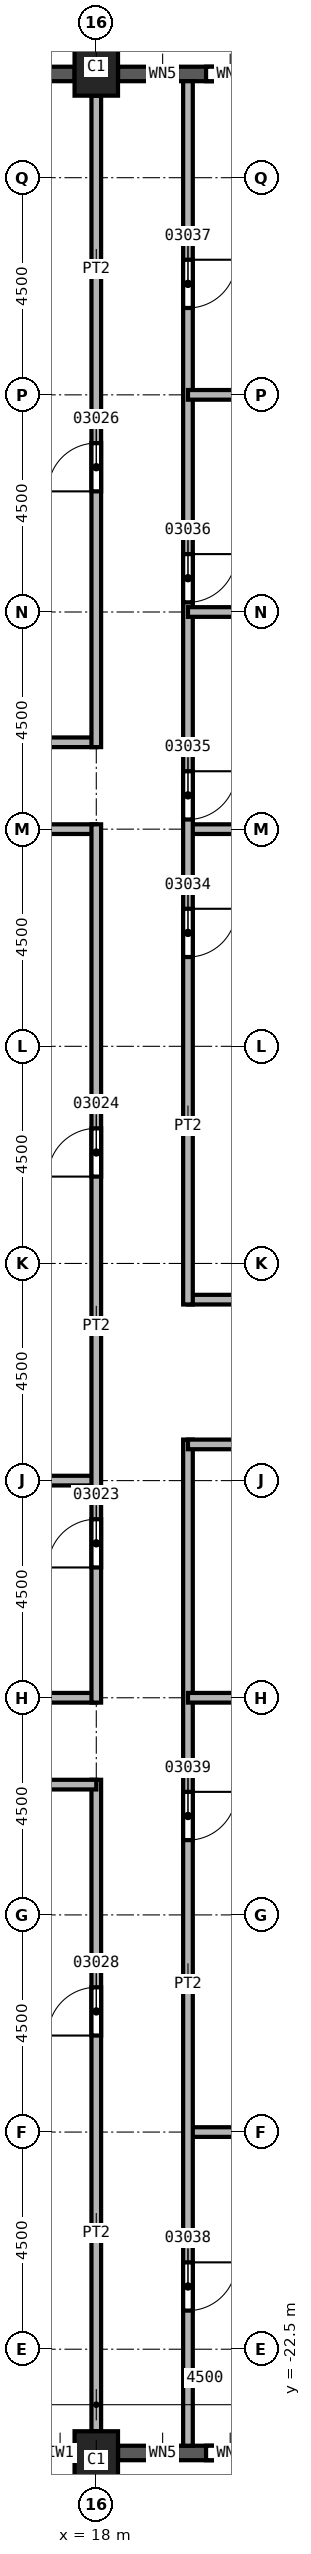
"""IFC4 building model, lengths in metres.
Left out: names, types, materials, properties, quantities, classifications, styles, units other than length and angle.
Written with IfcOpenShell. Run it as: python <this file> out.ifc"""

import sys

from ifc_helpers import new_model, si_unit, direction, frame, frame_2d, origin, origin_2d, place, context, subcontext, project, spatial, rectangle, extrude, element, fill, save


model = new_model("IFC4")
c1 = context("Model", 3, precision=1e-05, world=origin(), true_north=direction((0.0, 1.0)))
c2 = subcontext(c1, "Body", "Model", "MODEL_VIEW")
j1 = project(units=[si_unit("LENGTHUNIT", "METRE"), si_unit("PLANEANGLEUNIT", "RADIAN")], contexts=[c1])
p1 = place(None, origin())
s1 = spatial("IfcSite", under=j1, at=p1, CompositionType="ELEMENT")
p2 = place(p1, origin())
s2 = spatial("IfcBuilding", under=s1, at=p2, CompositionType="ELEMENT")
p3 = place(p2, frame((0.0, 0.0, 92.0)))
s3 = spatial("IfcBuildingStorey", under=s2, at=p3, CompositionType="ELEMENT", Elevation=92.0)
for number, where, z_axis, x_axis in (
    (1, (18.0, 24.8, 0.0), (0.0, 0.0, 1.0), (1.0, 0.0, 0.0)),
    (2, (18.0, -24.8, 0.0), (0.0, 0.0, 1.0), (1.0, 0.0, 0.0)),
):
    element("IfcColumn", number, at=place(p3, frame(where, z_axis=z_axis, x_axis=x_axis)), inside=s3, PredefinedType="COLUMN", context=c2, shape_type="SweptSolid", body=[
        extrude(rectangle(XDim=0.9, YDim=1.2, at=origin_2d()), origin(), (0.0, 0.0, 1.0), 3.7),
    ])
p4 = place(p3, frame((13.95, -24.65, 0.0), z_axis=(0.0, 0.0, 1.0), x_axis=(1.0, 0.0, 0.0)))
e3 = element("IfcWall", 3, at=p4, inside=s3, PredefinedType="SOLIDWALL", context=c2, shape_type="SweptSolid", body=[
    extrude(rectangle(XDim=3.6, YDim=0.3, at=frame_2d((1.8, 0.0))), origin(), (0.0, 0.0, 1.0), 3.1),
])
p5 = place(p4, frame((0.6, 0.0, 0.8)))
e4 = element("IfcOpeningElement", 4, at=p5, cuts=e3, PredefinedType="OPENING", context=c2, shape_type="SweptSolid", body=[
    extrude(rectangle(XDim=2.4, YDim=1.95, at=frame_2d((1.2, 0.975))), frame((0.0, 0.15, 0.0), z_axis=(0.0, -1.0, 0.0), x_axis=(1.0, 0.0, 0.0)), (0.0, 0.0, 1.0), 0.3),
])
p6 = place(p3, frame((18.45, -24.65, 0.0), z_axis=(0.0, 0.0, 1.0), x_axis=(1.0, 0.0, 0.0)))
e5 = element("IfcWall", 5, at=p6, inside=s3, PredefinedType="SOLIDWALL", context=c2, shape_type="SweptSolid", body=[
    extrude(rectangle(XDim=3.6, YDim=0.3, at=frame_2d((1.8, 0.0))), origin(), (0.0, 0.0, 1.0), 3.1),
])
p7 = place(p6, frame((0.625, 0.0, 0.8)))
e6 = element("IfcOpeningElement", 6, at=p7, cuts=e5, PredefinedType="OPENING", context=c2, shape_type="SweptSolid", body=[
    extrude(rectangle(XDim=0.6, YDim=1.95, at=frame_2d((0.3, 0.975))), frame((0.0, 0.15, 0.0), z_axis=(0.0, -1.0, 0.0), x_axis=(1.0, 0.0, 0.0)), (0.0, 0.0, 1.0), 0.3),
])
p8 = place(p6, frame((1.825, 0.0, 0.8)))
e7 = element("IfcOpeningElement", 7, at=p8, cuts=e5, PredefinedType="OPENING", context=c2, shape_type="SweptSolid", body=[
    extrude(rectangle(XDim=1.0, YDim=1.95, at=frame_2d((0.5, 0.975))), frame((0.0, 0.15, 0.0), z_axis=(0.0, -1.0, 0.0), x_axis=(1.0, 0.0, 0.0)), (0.0, 0.0, 1.0), 0.3),
])
p9 = place(p3, frame((22.05, 24.65, 0.0), z_axis=(0.0, 0.0, 1.0), x_axis=(-1.0, 0.0, 0.0)))
e8 = element("IfcWall", 8, at=p9, inside=s3, PredefinedType="SOLIDWALL", context=c2, shape_type="SweptSolid", body=[
    extrude(rectangle(XDim=3.6, YDim=0.3, at=frame_2d((1.8, 0.0))), origin(), (0.0, 0.0, 1.0), 3.1),
])
p10 = place(p9, frame((0.775, 0.0, 0.8)))
e9 = element("IfcOpeningElement", 9, at=p10, cuts=e8, PredefinedType="OPENING", context=c2, shape_type="SweptSolid", body=[
    extrude(rectangle(XDim=1.0, YDim=1.95, at=frame_2d((0.5, 0.975))), frame((0.0, 0.15, 0.0), z_axis=(0.0, -1.0, 0.0), x_axis=(1.0, 0.0, 0.0)), (0.0, 0.0, 1.0), 0.3),
])
p11 = place(p9, frame((2.375, 0.0, 0.8)))
e10 = element("IfcOpeningElement", 10, at=p11, cuts=e8, PredefinedType="OPENING", context=c2, shape_type="SweptSolid", body=[
    extrude(rectangle(XDim=0.6, YDim=1.95, at=frame_2d((0.3, 0.975))), frame((0.0, 0.15, 0.0), z_axis=(0.0, -1.0, 0.0), x_axis=(1.0, 0.0, 0.0)), (0.0, 0.0, 1.0), 0.3),
])
p12 = place(p3, frame((17.55, 24.65, 0.0), z_axis=(0.0, 0.0, 1.0), x_axis=(-1.0, 0.0, 0.0)))
e11 = element("IfcWall", 11, at=p12, inside=s3, PredefinedType="SOLIDWALL", context=c2, shape_type="SweptSolid", body=[
    extrude(rectangle(XDim=3.6, YDim=0.3, at=frame_2d((1.8, 0.0))), origin(), (0.0, 0.0, 1.0), 3.1),
])
p13 = place(p12, frame((0.6, 0.0, 0.8)))
e12 = element("IfcOpeningElement", 12, at=p13, cuts=e11, PredefinedType="OPENING", context=c2, shape_type="SweptSolid", body=[
    extrude(rectangle(XDim=2.4, YDim=1.95, at=frame_2d((1.2, 0.975))), frame((0.0, 0.15, 0.0), z_axis=(0.0, -1.0, 0.0), x_axis=(1.0, 0.0, 0.0)), (0.0, 0.0, 1.0), 0.3),
])
for number, where, z_axis, x_axis in (
    (13, (13.5, -9.0, 0.0), (0.0, 0.0, 1.0), (1.0, 0.0, 0.0)),
    (14, (13.5, -4.5, 0.0), (0.0, 0.0, 1.0), (1.0, 0.0, 0.0)),
    (15, (18.0, 9.0, 0.0), (0.0, 0.0, 1.0), (-1.0, 0.0, 0.0)),
):
    element("IfcWall", number, at=place(p3, frame(where, z_axis=z_axis, x_axis=x_axis)), inside=s3, PredefinedType="PARTITIONING", context=c2, shape_type="SweptSolid", body=[
        extrude(rectangle(XDim=4.5, YDim=0.2, at=frame_2d((2.25, 0.0))), origin(), (0.0, 0.0, 1.0), 3.7),
    ])
p14 = place(p3, frame((14.4, 10.8, 0.0), z_axis=(0.0, 0.0, 1.0), x_axis=(1.0, 0.0, 0.0)))
e16 = element("IfcWall", 16, at=p14, inside=s3, PredefinedType="PARTITIONING", context=c2, shape_type="SweptSolid", body=[
    extrude(rectangle(XDim=3.6, YDim=0.2, at=frame_2d((1.8, 0.0))), origin(), (0.0, 0.0, 1.0), 3.7),
])
p15 = place(p3, frame((18.0, -24.2, 0.0), z_axis=(0.0, 0.0, 1.0), x_axis=(0.0, 1.0, 0.0)))
e17 = element("IfcWall", 17, at=p15, inside=s3, PredefinedType="PARTITIONING", context=c2, shape_type="SweptSolid", body=[
    extrude(rectangle(XDim=13.5, YDim=0.2, at=frame_2d((6.75, 0.0))), origin(), (0.0, 0.0, 1.0), 3.7),
])
p16 = place(p15, frame((8.2, 0.0, 0.0)))
e18 = element("IfcOpeningElement", 18, at=p16, cuts=e17, PredefinedType="OPENING", context=c2, shape_type="SweptSolid", body=[
    extrude(rectangle(XDim=1.0, YDim=2.1, at=frame_2d((0.5, 1.05))), frame((0.0, 0.1, 0.0), z_axis=(0.0, -1.0, 0.0), x_axis=(1.0, 0.0, 0.0)), (0.0, 0.0, 1.0), 0.2),
])
p17 = place(p3, frame((18.0, -10.8, 0.0), z_axis=(0.0, 0.0, 1.0), x_axis=(-1.0, 0.0, 0.0)))
e19 = element("IfcWall", 19, at=p17, inside=s3, PredefinedType="PARTITIONING", context=c2, shape_type="SweptSolid", body=[
    extrude(rectangle(XDim=3.6, YDim=0.2, at=frame_2d((1.8, 0.0))), origin(), (0.0, 0.0, 1.0), 3.7),
])
p18 = place(p3, frame((18.0, -9.1, 0.0), z_axis=(0.0, 0.0, 1.0), x_axis=(0.0, 1.0, 0.0)))
e20 = element("IfcWall", 20, at=p18, inside=s3, PredefinedType="PARTITIONING", context=c2, shape_type="SweptSolid", body=[
    extrude(rectangle(XDim=18.2, YDim=0.2, at=frame_2d((9.1, 0.0))), origin(), (0.0, 0.0, 1.0), 3.7),
])
p19 = place(p18, frame((2.8, 0.0, 0.0)))
e21 = element("IfcOpeningElement", 21, at=p19, cuts=e20, PredefinedType="OPENING", context=c2, shape_type="SweptSolid", body=[
    extrude(rectangle(XDim=1.0, YDim=2.1, at=frame_2d((0.5, 1.05))), frame((0.0, 0.1, 0.0), z_axis=(0.0, -1.0, 0.0), x_axis=(1.0, 0.0, 0.0)), (0.0, 0.0, 1.0), 0.2),
])
p20 = place(p18, frame((10.9, 0.0, 0.0)))
e22 = element("IfcOpeningElement", 22, at=p20, cuts=e20, PredefinedType="OPENING", context=c2, shape_type="SweptSolid", body=[
    extrude(rectangle(XDim=1.0, YDim=2.1, at=frame_2d((0.5, 1.05))), frame((0.0, 0.1, 0.0), z_axis=(0.0, -1.0, 0.0), x_axis=(1.0, 0.0, 0.0)), (0.0, 0.0, 1.0), 0.2),
])
p21 = place(p3, frame((18.0, 10.7, 0.0), z_axis=(0.0, 0.0, 1.0), x_axis=(0.0, 1.0, 0.0)))
e23 = element("IfcWall", 23, at=p21, inside=s3, PredefinedType="PARTITIONING", context=c2, shape_type="SweptSolid", body=[
    extrude(rectangle(XDim=13.5, YDim=0.2, at=frame_2d((6.75, 0.0))), origin(), (0.0, 0.0, 1.0), 3.7),
])
p22 = place(p21, frame((5.3, 0.0, 0.0)))
e24 = element("IfcOpeningElement", 24, at=p22, cuts=e23, PredefinedType="OPENING", context=c2, shape_type="SweptSolid", body=[
    extrude(rectangle(XDim=1.0, YDim=2.1, at=frame_2d((0.5, 1.05))), frame((0.0, 0.1, 0.0), z_axis=(0.0, -1.0, 0.0), x_axis=(1.0, 0.0, 0.0)), (0.0, 0.0, 1.0), 0.2),
])
p23 = place(p3, frame((19.9, -18.0, 0.0), z_axis=(0.0, 0.0, 1.0), x_axis=(1.0, 0.0, 0.0)))
e25 = element("IfcWall", 25, at=p23, inside=s3, PredefinedType="PARTITIONING", context=c2, shape_type="SweptSolid", body=[
    extrude(rectangle(XDim=4.25, YDim=0.2, at=frame_2d((2.125, 0.0))), origin(), (0.0, 0.0, 1.0), 3.7),
])
p24 = place(p3, frame((19.9, -3.65, 0.0), z_axis=(0.0, 0.0, 1.0), x_axis=(0.0, -1.0, 0.0)))
e26 = element("IfcWall", 26, at=p24, inside=s3, PredefinedType="PARTITIONING", context=c2, shape_type="SweptSolid", body=[
    extrude(rectangle(XDim=20.85, YDim=0.2, at=frame_2d((10.425, 0.0))), origin(), (0.0, 0.0, 1.0), 3.7),
])
p25 = place(p24, frame((17.05, 0.0, 0.0)))
e27 = element("IfcOpeningElement", 27, at=p25, cuts=e26, PredefinedType="OPENING", context=c2, shape_type="SweptSolid", body=[
    extrude(rectangle(XDim=1.0, YDim=2.1, at=frame_2d((0.5, 1.05))), frame((0.0, 0.1, 0.0), z_axis=(0.0, -1.0, 0.0), x_axis=(1.0, 0.0, 0.0)), (0.0, 0.0, 1.0), 0.2),
])
p26 = place(p24, frame((7.3, 0.0, 0.0)))
e28 = element("IfcOpeningElement", 28, at=p26, cuts=e26, PredefinedType="OPENING", context=c2, shape_type="SweptSolid", body=[
    extrude(rectangle(XDim=1.0, YDim=2.1, at=frame_2d((0.5, 1.05))), frame((0.0, 0.1, 0.0), z_axis=(0.0, -1.0, 0.0), x_axis=(1.0, 0.0, 0.0)), (0.0, 0.0, 1.0), 0.2),
])
p27 = place(p3, frame((19.9, -9.0, 0.0), z_axis=(0.0, 0.0, 1.0), x_axis=(1.0, 0.0, 0.0)))
e29 = element("IfcWall", 29, at=p27, inside=s3, PredefinedType="PARTITIONING", context=c2, shape_type="SweptSolid", body=[
    extrude(rectangle(XDim=7.2, YDim=0.2, at=frame_2d((3.6, 0.0))), origin(), (0.0, 0.0, 1.0), 3.7),
])
p28 = place(p3, frame((19.9, -0.75, 0.0), z_axis=(0.0, 0.0, 1.0), x_axis=(1.0, 0.0, 0.0)))
e30 = element("IfcWall", 30, at=p28, inside=s3, PredefinedType="PARTITIONING", context=c2, shape_type="SweptSolid", body=[
    extrude(rectangle(XDim=13.95, YDim=0.2, at=frame_2d((6.975, 0.0))), origin(), (0.0, 0.0, 1.0), 3.7),
])
p29 = place(p3, frame((19.9, 9.0, 0.0), z_axis=(0.0, 0.0, 1.0), x_axis=(1.0, 0.0, 0.0)))
e31 = element("IfcWall", 31, at=p29, inside=s3, PredefinedType="PARTITIONING", context=c2, shape_type="SweptSolid", body=[
    extrude(rectangle(XDim=7.2, YDim=0.2, at=frame_2d((3.6, 0.0))), origin(), (0.0, 0.0, 1.0), 3.7),
])
p30 = place(p3, frame((19.9, 24.5, 0.0), z_axis=(0.0, 0.0, 1.0), x_axis=(0.0, -1.0, 0.0)))
e32 = element("IfcWall", 32, at=p30, inside=s3, PredefinedType="PARTITIONING", context=c2, shape_type="SweptSolid", body=[
    extrude(rectangle(XDim=25.35, YDim=0.2, at=frame_2d((12.675, 0.0))), origin(), (0.0, 0.0, 1.0), 3.7),
])
p31 = place(p30, frame((17.15, 0.0, 0.0)))
e33 = element("IfcOpeningElement", 33, at=p31, cuts=e32, PredefinedType="OPENING", context=c2, shape_type="SweptSolid", body=[
    extrude(rectangle(XDim=1.0, YDim=2.1, at=frame_2d((0.5, 1.05))), frame((0.0, 0.1, 0.0), z_axis=(0.0, -1.0, 0.0), x_axis=(1.0, 0.0, 0.0)), (0.0, 0.0, 1.0), 0.2),
])
p32 = place(p30, frame((14.3, 0.0, 0.0)))
e34 = element("IfcOpeningElement", 34, at=p32, cuts=e32, PredefinedType="OPENING", context=c2, shape_type="SweptSolid", body=[
    extrude(rectangle(XDim=1.0, YDim=2.1, at=frame_2d((0.5, 1.05))), frame((0.0, 0.1, 0.0), z_axis=(0.0, -1.0, 0.0), x_axis=(1.0, 0.0, 0.0)), (0.0, 0.0, 1.0), 0.2),
])
p33 = place(p30, frame((9.8, 0.0, 0.0)))
e35 = element("IfcOpeningElement", 35, at=p33, cuts=e32, PredefinedType="OPENING", context=c2, shape_type="SweptSolid", body=[
    extrude(rectangle(XDim=1.0, YDim=2.1, at=frame_2d((0.5, 1.05))), frame((0.0, 0.1, 0.0), z_axis=(0.0, -1.0, 0.0), x_axis=(1.0, 0.0, 0.0)), (0.0, 0.0, 1.0), 0.2),
])
p34 = place(p30, frame((3.7, 0.0, 0.0)))
e36 = element("IfcOpeningElement", 36, at=p34, cuts=e32, PredefinedType="OPENING", context=c2, shape_type="SweptSolid", body=[
    extrude(rectangle(XDim=1.0, YDim=2.1, at=frame_2d((0.5, 1.05))), frame((0.0, 0.1, 0.0), z_axis=(0.0, -1.0, 0.0), x_axis=(1.0, 0.0, 0.0)), (0.0, 0.0, 1.0), 0.2),
])
p35 = place(p3, frame((19.9, 13.5, 0.0), z_axis=(0.0, 0.0, 1.0), x_axis=(1.0, 0.0, 0.0)))
e37 = element("IfcWall", 37, at=p35, inside=s3, PredefinedType="PARTITIONING", context=c2, shape_type="SweptSolid", body=[
    extrude(rectangle(XDim=7.2, YDim=0.2, at=frame_2d((3.6, 0.0))), origin(), (0.0, 0.0, 1.0), 3.7),
])
p36 = place(p3, frame((19.9, 18.0, 0.0), z_axis=(0.0, 0.0, 1.0), x_axis=(1.0, 0.0, 0.0)))
e38 = element("IfcWall", 38, at=p36, inside=s3, PredefinedType="PARTITIONING", context=c2, shape_type="SweptSolid", body=[
    extrude(rectangle(XDim=4.25, YDim=0.2, at=frame_2d((2.125, 0.0))), origin(), (0.0, 0.0, 1.0), 3.7),
])
p37 = place(p3, frame((33.85, -3.75, 0.0), z_axis=(0.0, 0.0, 1.0), x_axis=(-1.0, 0.0, 0.0)))
e39 = element("IfcWall", 39, at=p37, inside=s3, PredefinedType="PARTITIONING", context=c2, shape_type="SweptSolid", body=[
    extrude(rectangle(XDim=13.95, YDim=0.2, at=frame_2d((6.975, 0.0))), origin(), (0.0, 0.0, 1.0), 3.7),
])
p38 = place(p37, frame((8.05, 0.0, 0.0)))
e40 = element("IfcOpeningElement", 40, at=p38, cuts=e39, PredefinedType="OPENING", context=c2, shape_type="SweptSolid", body=[
    extrude(rectangle(XDim=1.0, YDim=2.1, at=frame_2d((0.5, 1.05))), frame((0.0, 0.1, 0.0), z_axis=(0.0, -1.0, 0.0), x_axis=(1.0, 0.0, 0.0)), (0.0, 0.0, 1.0), 0.2),
])
p39 = place(p19, origin())
e41 = element("IfcDoor", 41, at=p39, inside=s3, OperationType="SINGLE_SWING_RIGHT", PredefinedType="DOOR", context=c2, shape_type="SweptSolid", body=[
    extrude(rectangle(XDim=1.0, YDim=2.1, at=frame_2d((0.5, 1.05))), frame((0.0, 0.025, 0.0), z_axis=(0.0, -1.0, 0.0), x_axis=(1.0, 0.0, 0.0)), (0.0, 0.0, 1.0), 0.05),
])
fill(e21, e41)
p40 = place(p20, origin())
e42 = element("IfcDoor", 42, at=p40, inside=s3, OperationType="SINGLE_SWING_LEFT", PredefinedType="DOOR", context=c2, shape_type="SweptSolid", body=[
    extrude(rectangle(XDim=1.0, YDim=2.1, at=frame_2d((0.5, 1.05))), frame((0.0, 0.025, 0.0), z_axis=(0.0, -1.0, 0.0), x_axis=(1.0, 0.0, 0.0)), (0.0, 0.0, 1.0), 0.05),
])
fill(e22, e42)
p41 = place(p22, origin())
e43 = element("IfcDoor", 43, at=p41, inside=s3, OperationType="SINGLE_SWING_LEFT", PredefinedType="DOOR", context=c2, shape_type="SweptSolid", body=[
    extrude(rectangle(XDim=1.0, YDim=2.1, at=frame_2d((0.5, 1.05))), frame((0.0, 0.025, 0.0), z_axis=(0.0, -1.0, 0.0), x_axis=(1.0, 0.0, 0.0)), (0.0, 0.0, 1.0), 0.05),
])
fill(e24, e43)
p42 = place(p16, origin())
e44 = element("IfcDoor", 44, at=p42, inside=s3, OperationType="SINGLE_SWING_LEFT", PredefinedType="DOOR", context=c2, shape_type="SweptSolid", body=[
    extrude(rectangle(XDim=1.0, YDim=2.1, at=frame_2d((0.5, 1.05))), frame((0.0, 0.025, 0.0), z_axis=(0.0, -1.0, 0.0), x_axis=(1.0, 0.0, 0.0)), (0.0, 0.0, 1.0), 0.05),
])
fill(e18, e44)
p43 = place(p31, origin())
e45 = element("IfcDoor", 45, at=p43, inside=s3, OperationType="SINGLE_SWING_LEFT", PredefinedType="DOOR", context=c2, shape_type="SweptSolid", body=[
    extrude(rectangle(XDim=1.0, YDim=2.1, at=frame_2d((0.5, 1.05))), frame((0.0, 0.025, 0.0), z_axis=(0.0, -1.0, 0.0), x_axis=(1.0, 0.0, 0.0)), (0.0, 0.0, 1.0), 0.05),
])
fill(e33, e45)
p44 = place(p32, origin())
e46 = element("IfcDoor", 46, at=p44, inside=s3, OperationType="SINGLE_SWING_RIGHT", PredefinedType="DOOR", context=c2, shape_type="SweptSolid", body=[
    extrude(rectangle(XDim=1.0, YDim=2.1, at=frame_2d((0.5, 1.05))), frame((0.0, 0.025, 0.0), z_axis=(0.0, -1.0, 0.0), x_axis=(1.0, 0.0, 0.0)), (0.0, 0.0, 1.0), 0.05),
])
fill(e34, e46)
p45 = place(p33, origin())
e47 = element("IfcDoor", 47, at=p45, inside=s3, OperationType="SINGLE_SWING_LEFT", PredefinedType="DOOR", context=c2, shape_type="SweptSolid", body=[
    extrude(rectangle(XDim=1.0, YDim=2.1, at=frame_2d((0.5, 1.05))), frame((0.0, 0.025, 0.0), z_axis=(0.0, -1.0, 0.0), x_axis=(1.0, 0.0, 0.0)), (0.0, 0.0, 1.0), 0.05),
])
fill(e35, e47)
p46 = place(p34, origin())
e48 = element("IfcDoor", 48, at=p46, inside=s3, OperationType="SINGLE_SWING_RIGHT", PredefinedType="DOOR", context=c2, shape_type="SweptSolid", body=[
    extrude(rectangle(XDim=1.0, YDim=2.1, at=frame_2d((0.5, 1.05))), frame((0.0, 0.025, 0.0), z_axis=(0.0, -1.0, 0.0), x_axis=(1.0, 0.0, 0.0)), (0.0, 0.0, 1.0), 0.05),
])
fill(e36, e48)
p47 = place(p25, origin())
e49 = element("IfcDoor", 49, at=p47, inside=s3, OperationType="SINGLE_SWING_LEFT", PredefinedType="DOOR", context=c2, shape_type="SweptSolid", body=[
    extrude(rectangle(XDim=1.0, YDim=2.1, at=frame_2d((0.5, 1.05))), frame((0.0, 0.025, 0.0), z_axis=(0.0, -1.0, 0.0), x_axis=(1.0, 0.0, 0.0)), (0.0, 0.0, 1.0), 0.05),
])
fill(e27, e49)
p48 = place(p26, origin())
e50 = element("IfcDoor", 50, at=p48, inside=s3, OperationType="SINGLE_SWING_RIGHT", PredefinedType="DOOR", context=c2, shape_type="SweptSolid", body=[
    extrude(rectangle(XDim=1.0, YDim=2.1, at=frame_2d((0.5, 1.05))), frame((0.0, 0.025, 0.0), z_axis=(0.0, -1.0, 0.0), x_axis=(1.0, 0.0, 0.0)), (0.0, 0.0, 1.0), 0.05),
])
fill(e28, e50)
p49 = place(p7, origin())
e51 = element("IfcWindow", 51, at=p49, inside=s3, PartitioningType="SINGLE_PANEL", PredefinedType="WINDOW", context=c2, shape_type="SweptSolid", body=[
    extrude(rectangle(XDim=0.6, YDim=1.95, at=frame_2d((0.3, 0.975))), frame((0.0, 0.03, 0.0), z_axis=(0.0, -1.0, 0.0), x_axis=(1.0, 0.0, 0.0)), (0.0, 0.0, 1.0), 0.06),
])
fill(e6, e51)
p50 = place(p8, origin())
e52 = element("IfcWindow", 52, at=p50, inside=s3, PartitioningType="SINGLE_PANEL", PredefinedType="WINDOW", context=c2, shape_type="SweptSolid", body=[
    extrude(rectangle(XDim=1.0, YDim=1.95, at=frame_2d((0.5, 0.975))), frame((0.0, 0.03, 0.0), z_axis=(0.0, -1.0, 0.0), x_axis=(1.0, 0.0, 0.0)), (0.0, 0.0, 1.0), 0.06),
])
fill(e7, e52)
p51 = place(p10, origin())
e53 = element("IfcWindow", 53, at=p51, inside=s3, PartitioningType="SINGLE_PANEL", PredefinedType="WINDOW", context=c2, shape_type="SweptSolid", body=[
    extrude(rectangle(XDim=1.0, YDim=1.95, at=frame_2d((0.5, 0.975))), frame((0.0, 0.03, 0.0), z_axis=(0.0, -1.0, 0.0), x_axis=(1.0, 0.0, 0.0)), (0.0, 0.0, 1.0), 0.06),
])
fill(e9, e53)
p52 = place(p11, origin())
e54 = element("IfcWindow", 54, at=p52, inside=s3, PartitioningType="SINGLE_PANEL", PredefinedType="WINDOW", context=c2, shape_type="SweptSolid", body=[
    extrude(rectangle(XDim=0.6, YDim=1.95, at=frame_2d((0.3, 0.975))), frame((0.0, 0.03, 0.0), z_axis=(0.0, -1.0, 0.0), x_axis=(1.0, 0.0, 0.0)), (0.0, 0.0, 1.0), 0.06),
])
fill(e10, e54)
save(model, sys.argv[1])
